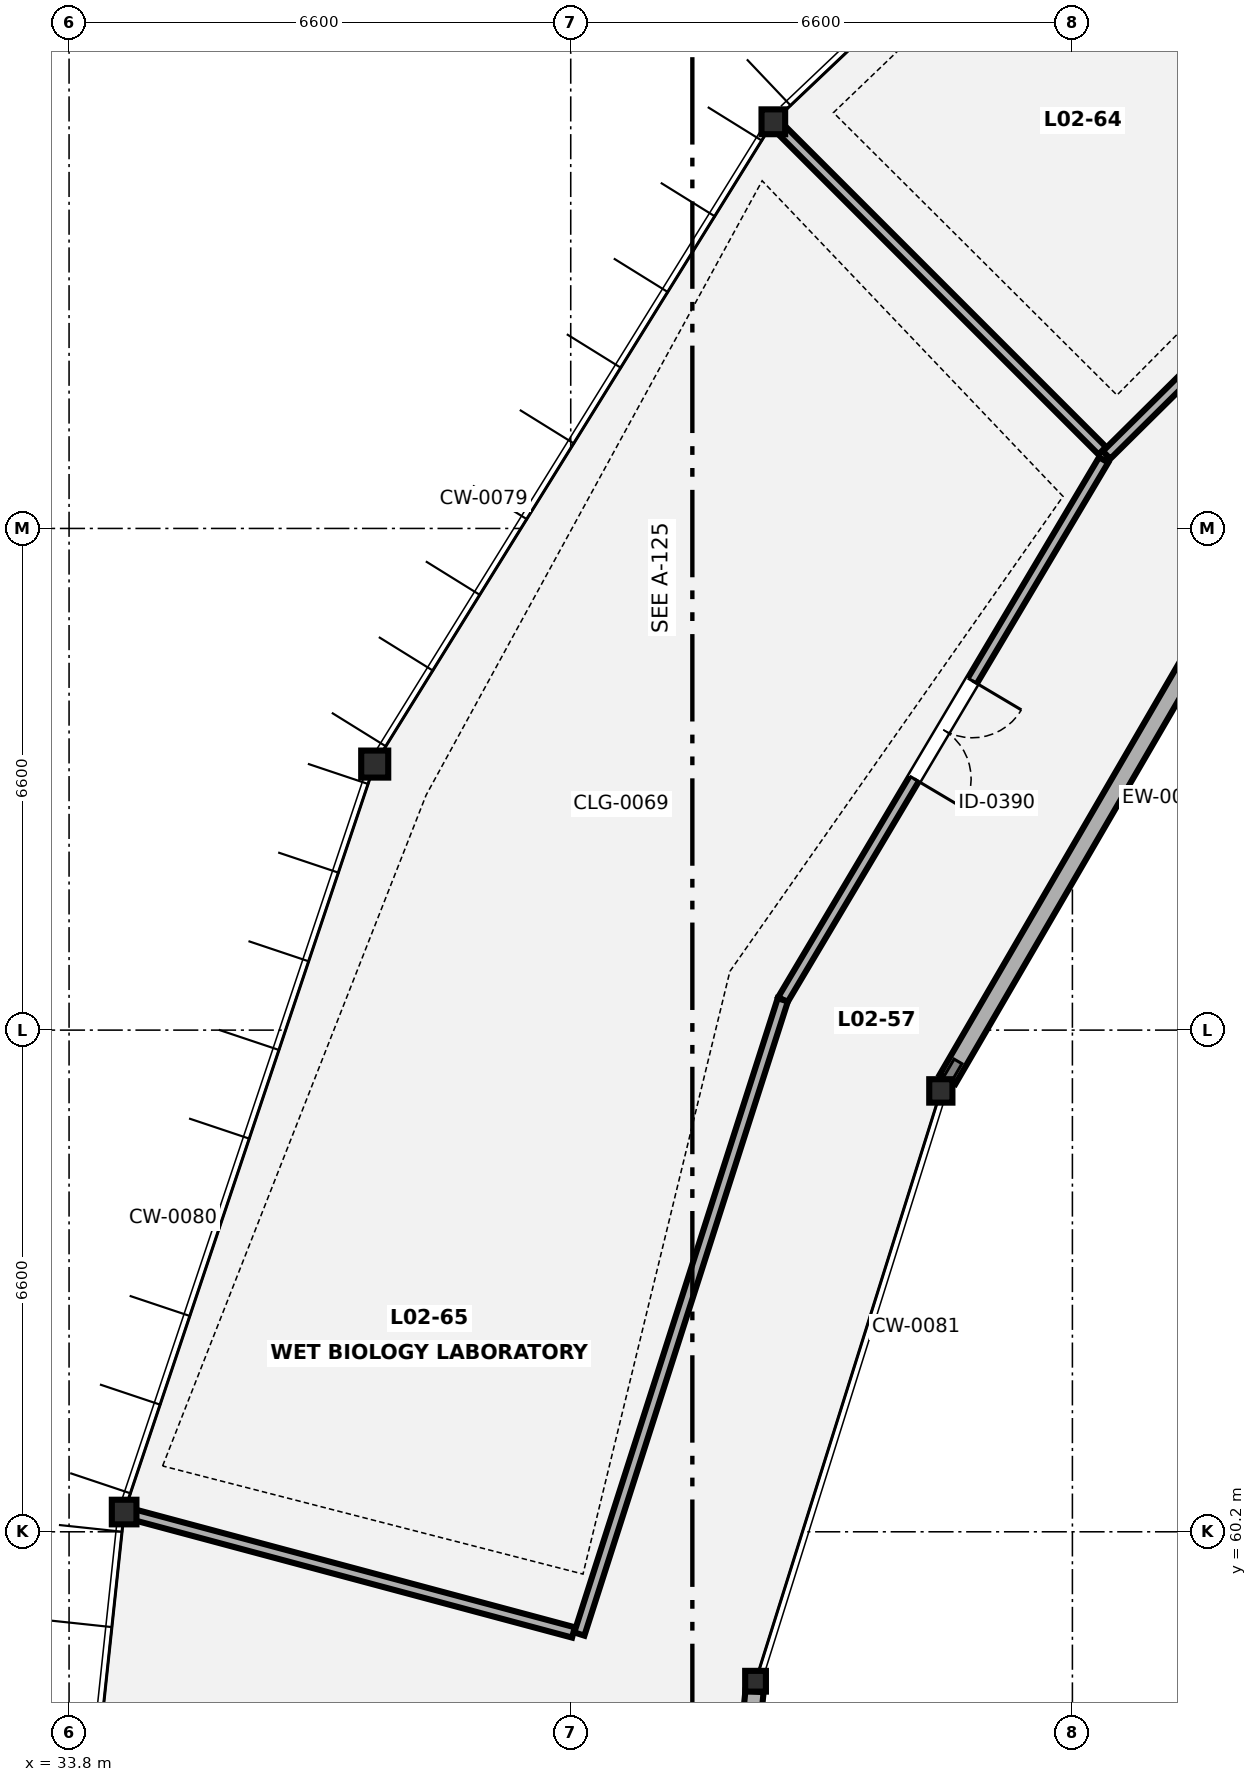
"""IFC4 building model, lengths in metres.
Left out: names, types, materials, properties, quantities, classifications, styles, units other than length and angle.
Written with IfcOpenShell. Run it as: python <this file> out.ifc"""

import sys

from ifc_helpers import new_model, si_unit, direction, frame, frame_2d, origin, origin_2d, place, context, subcontext, project, spatial, rectangle, hollow_circle, i_section, extrude, element, fill, save


model = new_model("IFC4")
c1 = context("Model", 3, precision=1e-05, world=origin(), true_north=direction((0.0, 1.0)))
c2 = subcontext(c1, "Body", "Model", "MODEL_VIEW")
j1 = project(units=[si_unit("LENGTHUNIT", "METRE"), si_unit("PLANEANGLEUNIT", "RADIAN")], contexts=[c1])
p1 = place(None, origin())
s1 = spatial("IfcSite", under=j1, at=p1, CompositionType="ELEMENT")
p2 = place(p1, origin())
s2 = spatial("IfcBuilding", under=s1, at=p2, CompositionType="ELEMENT")
p3 = place(p2, frame((0.0, 0.0, 9.1)))
s3 = spatial("IfcBuildingStorey", under=s2, at=p3, CompositionType="ELEMENT", Elevation=9.1)
p4 = place(p3, frame((43.065, 78.75, 0.0), z_axis=(0.0, 0.0, 1.0), x_axis=(1.0, 0.0, 0.0)))
e1 = element("IfcColumn", 1, at=p4, inside=s3, PredefinedType="COLUMN", context=c2, shape_type="SweptSolid", body=[
    extrude(i_section(OverallWidth=0.311, OverallDepth=0.327, WebThickness=0.016, FlangeThickness=0.025, FilletRadius=0.017, at=origin_2d()), origin(), (0.0, 0.0, 1.0), 4.2),
])
p5 = place(p3, frame((37.821, 70.3, 0.0), z_axis=(0.0, 0.0, 1.0), x_axis=(1.0, 0.0, 0.0)))
e2 = element("IfcColumn", 2, at=p5, inside=s3, PredefinedType="COLUMN", context=c2, shape_type="SweptSolid", body=[
    extrude(hollow_circle(Radius=0.178, WallThickness=0.013, at=origin_2d()), origin(), (0.0, 0.0, 1.0), 4.2),
])
p6 = place(p3, frame((45.269, 66.0, 0.0), z_axis=(0.0, 0.0, 1.0), x_axis=(1.0, 0.0, 0.0)))
e3 = element("IfcColumn", 3, at=p6, inside=s3, PredefinedType="COLUMN", context=c2, shape_type="SweptSolid", body=[
    extrude(i_section(OverallWidth=0.305, OverallDepth=0.308, WebThickness=0.01, FlangeThickness=0.015, FilletRadius=0.017, at=origin_2d()), origin(), (0.0, 0.0, 1.0), 4.2),
])
p7 = place(p3, frame((34.524, 60.46, 0.0), z_axis=(0.0, 0.0, 1.0), x_axis=(1.0, 0.0, 0.0)))
e4 = element("IfcColumn", 4, at=p7, inside=s3, PredefinedType="COLUMN", context=c2, shape_type="SweptSolid", body=[
    extrude(hollow_circle(Radius=0.162, WallThickness=0.013, at=origin_2d()), origin(), (0.0, 0.0, 1.0), 4.2),
])
p8 = place(p3, frame((42.831, 58.234, 0.0), z_axis=(0.0, 0.0, 1.0), x_axis=(1.0, 0.0, 0.0)))
e5 = element("IfcColumn", 5, at=p8, inside=s3, PredefinedType="COLUMN", context=c2, shape_type="SweptSolid", body=[
    extrude(hollow_circle(Radius=0.136, WallThickness=0.009, at=origin_2d()), origin(), (0.0, 0.0, 1.0), 4.2),
])
p9 = place(p3, frame((49.056, 72.513, 0.0), z_axis=(0.0, 0.0, 1.0), x_axis=(-0.502653329169, -0.86448807434, 0.0)))
e6 = element("IfcWall", 6, at=p9, inside=s3, PredefinedType="SOLIDWALL", context=c2, shape_type="SweptSolid", body=[
    extrude(rectangle(XDim=7.358, YDim=0.24, at=frame_2d((3.679, 0.0))), origin(), (0.0, 0.0, 1.0), 3.65),
])
p10 = place(p3, frame((42.818, 58.1, 0.0), z_axis=(0.0, 0.0, 1.0), x_axis=(-0.099291432912, -0.99505839595, 0.0)))
e7 = element("IfcWall", 7, at=p10, inside=s3, PredefinedType="SOLIDWALL", context=c2, shape_type="SweptSolid", body=[
    extrude(rectangle(XDim=8.085, YDim=0.24, at=frame_2d((4.042, 0.0))), origin(), (0.0, 0.0, 1.0), 3.65),
])
p11 = place(p10, frame((3.317, 0.0, 0.85)))
e8 = element("IfcOpeningElement", 8, at=p11, cuts=e7, PredefinedType="OPENING", context=c2, shape_type="SweptSolid", body=[
    extrude(rectangle(XDim=1.45, YDim=1.25, at=frame_2d((0.725, 0.625))), frame((0.0, 0.13, 0.0), z_axis=(0.0, -1.0, 0.0), x_axis=(1.0, 0.0, 0.0)), (0.0, 0.0, 1.0), 0.26),
])
p12 = place(p3, frame((52.999, 79.863, 0.0), z_axis=(0.0, 0.0, 1.0), x_axis=(-0.710427757183, -0.703770134222, 0.0)))
e9 = element("IfcWall", 9, at=p12, inside=s3, PredefinedType="PARTITIONING", context=c2, shape_type="SweptSolid", body=[
    extrude(rectangle(XDim=7.811, YDim=0.14, at=frame_2d((3.905, 0.0))), origin(), (0.0, 0.0, 1.0), 4.0),
])
p13 = place(p12, frame((3.381, 0.0, 0.0)))
e10 = element("IfcOpeningElement", 10, at=p13, cuts=e9, PredefinedType="OPENING", context=c2, shape_type="SweptSolid", body=[
    extrude(rectangle(XDim=1.05, YDim=2.15, at=frame_2d((0.525, 1.075))), frame((0.0, 0.08, 0.0), z_axis=(0.0, -1.0, 0.0), x_axis=(1.0, 0.0, 0.0)), (0.0, 0.0, 1.0), 0.16),
])
p14 = place(p3, frame((47.393, 74.423, 0.0), z_axis=(0.0, 0.0, 1.0), x_axis=(-0.707106781187, 0.707106781187, 0.0)))
e11 = element("IfcWall", 11, at=p14, inside=s3, PredefinedType="PARTITIONING", context=c2, shape_type="SweptSolid", body=[
    extrude(rectangle(XDim=6.06, YDim=0.14, at=frame_2d((3.03, 0.0))), origin(), (0.0, 0.0, 1.0), 3.323),
])
p15 = place(p3, frame((47.412, 74.302, 0.0), z_axis=(0.0, 0.0, 1.0), x_axis=(-0.51092787214, -0.85962358592, 0.0)))
e12 = element("IfcWall", 12, at=p15, inside=s3, PredefinedType="PARTITIONING", context=c2, shape_type="SweptSolid", body=[
    extrude(rectangle(XDim=8.262, YDim=0.14, at=frame_2d((4.131, 0.0))), origin(), (0.0, 0.0, 1.0), 4.0),
])
p16 = place(p15, frame((3.381, 0.0, 0.0)))
e13 = element("IfcOpeningElement", 13, at=p16, cuts=e12, PredefinedType="OPENING", context=c2, shape_type="SweptSolid", body=[
    extrude(rectangle(XDim=1.5, YDim=2.15, at=frame_2d((0.75, 1.075))), frame((0.0, 0.08, 0.0), z_axis=(0.0, -1.0, 0.0), x_axis=(1.0, 0.0, 0.0)), (0.0, 0.0, 1.0), 0.16),
])
p17 = place(p3, frame((43.19, 67.198, 0.0), z_axis=(0.0, 0.0, 1.0), x_axis=(-0.305499533667, -0.952192225829, 0.0)))
e14 = element("IfcWall", 14, at=p17, inside=s3, PredefinedType="PARTITIONING", context=c2, shape_type="SweptSolid", body=[
    extrude(rectangle(XDim=8.762, YDim=0.14, at=frame_2d((4.381, 0.0))), origin(), (0.0, 0.0, 1.0), 4.0),
])
p18 = place(p3, frame((40.436, 58.876, 0.0), z_axis=(0.0, 0.0, 1.0), x_axis=(-0.965916578341, 0.258853556448, 0.0)))
e15 = element("IfcWall", 15, at=p18, inside=s3, PredefinedType="PARTITIONING", context=c2, shape_type="SweptSolid", body=[
    extrude(rectangle(XDim=6.06, YDim=0.14, at=frame_2d((3.03, 0.0))), origin(), (0.0, 0.0, 1.0), 3.392),
])
p19 = place(p16, origin())
e16 = element("IfcDoor", 16, at=p19, inside=s3, OperationType="DOUBLE_DOOR_SINGLE_SWING", PredefinedType="DOOR", context=c2, shape_type="SweptSolid", body=[
    extrude(rectangle(XDim=1.5, YDim=2.15, at=frame_2d((0.75, 1.075))), frame((0.0, 0.025, 0.0), z_axis=(0.0, -1.0, 0.0), x_axis=(1.0, 0.0, 0.0)), (0.0, 0.0, 1.0), 0.05),
])
fill(e13, e16)
save(model, sys.argv[1])
